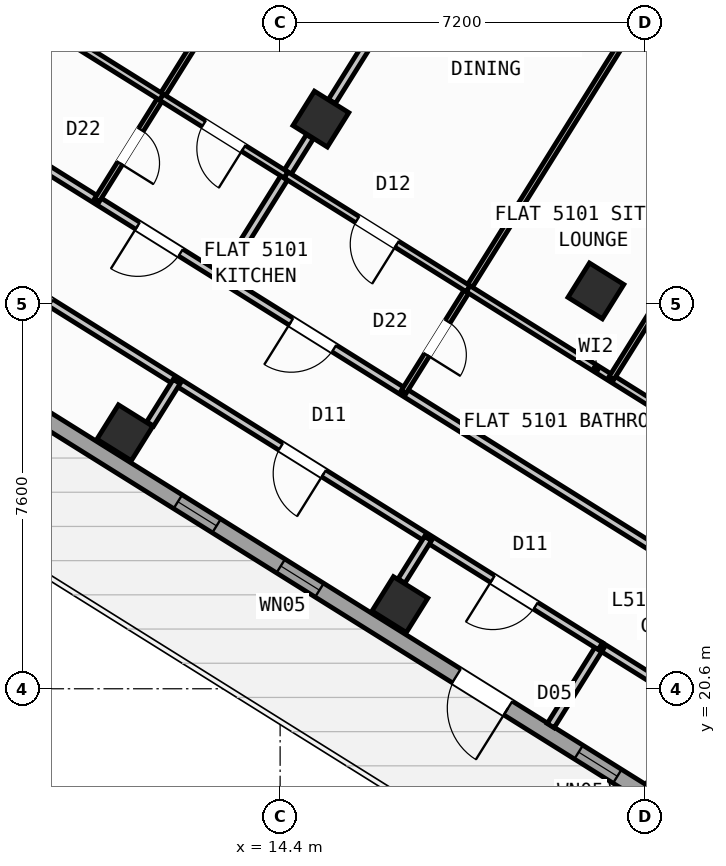
"""IFC4 building model, lengths in metres.
Left out: names, types, materials, properties, quantities, classifications, styles, units other than length and angle.
Written with IfcOpenShell. Run it as: python <this file> out.ifc"""

import sys

from ifc_helpers import new_model, si_unit, direction, frame, frame_2d, origin, origin_2d, place, context, subcontext, project, spatial, rectangle, hollow_rectangle, extrude, source, transform, mapped, element, fill, save


model = new_model("IFC4")
c1 = context("Model", 3, precision=1e-05, world=origin(), true_north=direction((0.0, 1.0)))
c2 = subcontext(c1, "Body", "Model", "MODEL_VIEW")
j1 = project(units=[si_unit("LENGTHUNIT", "METRE"), si_unit("PLANEANGLEUNIT", "RADIAN")], contexts=[c1])
p1 = place(None, origin())
s1 = spatial("IfcSite", under=j1, at=p1, CompositionType="ELEMENT")
p2 = place(p1, origin())
s2 = spatial("IfcBuilding", under=s1, at=p2, CompositionType="ELEMENT")
p3 = place(p2, frame((0.0, 0.0, 204.0)))
s3 = spatial("IfcBuildingStorey", under=s2, at=p3, CompositionType="ELEMENT", Elevation=204.0)
m1 = source(origin(), c2, "Body", "SweptSolid", [
    extrude(hollow_rectangle(XDim=0.8, YDim=0.8, WallThickness=0.032, at=origin_2d()), origin(), (0.0, 0.0, 1.0), 3.6),
])
for number, where, z_axis, x_axis in (
    (1, (20.632, 28.452, 0.0), (0.0, 0.0, 1.0), (-0.848, 0.53, 0.0)),
    (2, (16.764, 22.261, 0.0), (0.0, 0.0, 1.0), (-0.848, 0.53, 0.0)),
    (3, (15.205, 31.844, 0.0), (0.0, 0.0, 1.0), (-0.848, 0.53, 0.0)),
    (4, (11.336, 25.653, 0.0), (0.0, 0.0, 1.0), (-0.848, 0.53, 0.0)),
):
    element("IfcColumn", number, at=place(p3, frame(where, z_axis=z_axis, x_axis=x_axis)), inside=s3, PredefinedType="COLUMN", context=c2, shape_type="MappedRepresentation", body=[
        mapped(m1, transform((0.0, 0.0, 0.0), scale=1.0)),
    ])
p4 = place(p3, frame((31.76, 12.183, 0.0), z_axis=(0.0, 0.0, 1.0), x_axis=(-0.848047074256, 0.529920899612, 0.0)))
e5 = element("IfcWall", 5, at=p4, inside=s3, PredefinedType="STANDARD", context=c2, shape_type="SweptSolid", body=[
    extrude(rectangle(XDim=30.652, YDim=0.32, at=frame_2d((15.326, 0.0))), origin(), (0.0, 0.0, 1.0), 3.35),
])
p5 = place(p4, frame((15.166, 0.0, 0.0)))
e6 = element("IfcOpeningElement", 6, at=p5, cuts=e5, PredefinedType="OPENING", context=c2, shape_type="SweptSolid", body=[
    extrude(rectangle(XDim=1.2, YDim=2.15, at=frame_2d((0.6, 1.075))), frame((0.0, 0.17, 0.0), z_axis=(0.0, -1.0, 0.0), x_axis=(1.0, 0.0, 0.0)), (0.0, 0.0, 1.0), 0.34),
])
p6 = place(p4, frame((2.24, 0.0, 0.9)))
e7 = element("IfcOpeningElement", 7, at=p6, cuts=e5, PredefinedType="OPENING", context=c2, shape_type="SweptSolid", body=[
    extrude(rectangle(XDim=1.65, YDim=1.45, at=frame_2d((0.825, 0.725))), frame((0.0, 0.17, 0.0), z_axis=(0.0, -1.0, 0.0), x_axis=(1.0, 0.0, 0.0)), (0.0, 0.0, 1.0), 0.34),
])
p7 = place(p4, frame((7.469, 0.0, 0.9)))
e8 = element("IfcOpeningElement", 8, at=p7, cuts=e5, PredefinedType="OPENING", context=c2, shape_type="SweptSolid", body=[
    extrude(rectangle(XDim=1.65, YDim=1.45, at=frame_2d((0.825, 0.725))), frame((0.0, 0.17, 0.0), z_axis=(0.0, -1.0, 0.0), x_axis=(1.0, 0.0, 0.0)), (0.0, 0.0, 1.0), 0.34),
])
p8 = place(p4, frame((12.623, 0.0, 1.0)))
e9 = element("IfcOpeningElement", 9, at=p8, cuts=e5, PredefinedType="OPENING", context=c2, shape_type="SweptSolid", body=[
    extrude(rectangle(XDim=0.9, YDim=1.25, at=frame_2d((0.45, 0.625))), frame((0.0, 0.17, 0.0), z_axis=(0.0, -1.0, 0.0), x_axis=(1.0, 0.0, 0.0)), (0.0, 0.0, 1.0), 0.34),
])
p9 = place(p4, frame((19.556, 0.0, 1.0)))
e10 = element("IfcOpeningElement", 10, at=p9, cuts=e5, PredefinedType="OPENING", context=c2, shape_type="SweptSolid", body=[
    extrude(rectangle(XDim=0.9, YDim=1.25, at=frame_2d((0.45, 0.625))), frame((0.0, 0.17, 0.0), z_axis=(0.0, -1.0, 0.0), x_axis=(1.0, 0.0, 0.0)), (0.0, 0.0, 1.0), 0.34),
])
p10 = place(p4, frame((21.95, 0.0, 1.0)))
e11 = element("IfcOpeningElement", 11, at=p10, cuts=e5, PredefinedType="OPENING", context=c2, shape_type="SweptSolid", body=[
    extrude(rectangle(XDim=0.9, YDim=1.25, at=frame_2d((0.45, 0.625))), frame((0.0, 0.17, 0.0), z_axis=(0.0, -1.0, 0.0), x_axis=(1.0, 0.0, 0.0)), (0.0, 0.0, 1.0), 0.34),
])
p11 = place(p4, frame((26.983, 0.0, 0.9)))
e12 = element("IfcOpeningElement", 12, at=p11, cuts=e5, PredefinedType="OPENING", context=c2, shape_type="SweptSolid", body=[
    extrude(rectangle(XDim=1.35, YDim=1.45, at=frame_2d((0.675, 0.725))), frame((0.0, 0.17, 0.0), z_axis=(0.0, -1.0, 0.0), x_axis=(1.0, 0.0, 0.0)), (0.0, 0.0, 1.0), 0.34),
])
p12 = place(p3, frame((5.7, 28.71, 0.0), z_axis=(0.0, 0.0, 1.0), x_axis=(0.529923711467, 0.8480453172, 0.0)))
e13 = element("IfcWall", 13, at=p12, inside=s3, PredefinedType="STANDARD", context=c2, shape_type="SweptSolid", body=[
    extrude(rectangle(XDim=21.587, YDim=0.32, at=frame_2d((10.794, 0.0))), origin(), (0.0, 0.0, 1.0), 2.825),
])
p13 = place(p12, frame((4.749, 0.0, 1.0)))
e14 = element("IfcOpeningElement", 14, at=p13, cuts=e13, PredefinedType="OPENING", context=c2, shape_type="SweptSolid", body=[
    extrude(rectangle(XDim=0.9, YDim=1.25, at=frame_2d((0.45, 0.625))), frame((0.0, 0.17, 0.0), z_axis=(0.0, -1.0, 0.0), x_axis=(1.0, 0.0, 0.0)), (0.0, 0.0, 1.0), 0.34),
])
p14 = place(p12, frame((9.219, 0.0, 0.9)))
e15 = element("IfcOpeningElement", 15, at=p14, cuts=e13, PredefinedType="OPENING", context=c2, shape_type="SweptSolid", body=[
    extrude(rectangle(XDim=1.35, YDim=1.45, at=frame_2d((0.675, 0.725))), frame((0.0, 0.17, 0.0), z_axis=(0.0, -1.0, 0.0), x_axis=(1.0, 0.0, 0.0)), (0.0, 0.0, 1.0), 0.34),
])
p15 = place(p12, frame((12.119, 0.0, 0.9)))
e16 = element("IfcOpeningElement", 16, at=p15, cuts=e13, PredefinedType="OPENING", context=c2, shape_type="SweptSolid", body=[
    extrude(rectangle(XDim=1.35, YDim=1.45, at=frame_2d((0.675, 0.725))), frame((0.0, 0.17, 0.0), z_axis=(0.0, -1.0, 0.0), x_axis=(1.0, 0.0, 0.0)), (0.0, 0.0, 1.0), 0.34),
])
p16 = place(p12, frame((16.5, 0.0, 1.0)))
e17 = element("IfcOpeningElement", 17, at=p16, cuts=e13, PredefinedType="OPENING", context=c2, shape_type="SweptSolid", body=[
    extrude(rectangle(XDim=0.9, YDim=1.25, at=frame_2d((0.45, 0.625))), frame((0.0, 0.17, 0.0), z_axis=(0.0, -1.0, 0.0), x_axis=(1.0, 0.0, 0.0)), (0.0, 0.0, 1.0), 0.34),
])
p17 = place(p12, frame((18.913, 0.0, 1.0)))
e18 = element("IfcOpeningElement", 18, at=p17, cuts=e13, PredefinedType="OPENING", context=c2, shape_type="SweptSolid", body=[
    extrude(rectangle(XDim=0.9, YDim=1.25, at=frame_2d((0.45, 0.625))), frame((0.0, 0.17, 0.0), z_axis=(0.0, -1.0, 0.0), x_axis=(1.0, 0.0, 0.0)), (0.0, 0.0, 1.0), 0.34),
])
p18 = place(p3, frame((17.424, 47.083, 0.0), z_axis=(0.0, 0.0, 1.0), x_axis=(0.848049927979, -0.529916332693, 0.0)))
e19 = element("IfcWall", 19, at=p18, inside=s3, PredefinedType="STANDARD", context=c2, shape_type="SweptSolid", body=[
    extrude(rectangle(XDim=29.223, YDim=0.32, at=frame_2d((14.612, 0.0))), origin(), (0.0, 0.0, 1.0), 3.35),
])
p19 = place(p18, frame((8.799, 0.0, 0.0)))
e20 = element("IfcOpeningElement", 20, at=p19, cuts=e19, PredefinedType="OPENING", context=c2, shape_type="SweptSolid", body=[
    extrude(rectangle(XDim=1.05, YDim=2.15, at=frame_2d((0.525, 1.075))), frame((0.0, 0.17, 0.0), z_axis=(0.0, -1.0, 0.0), x_axis=(1.0, 0.0, 0.0)), (0.0, 0.0, 1.0), 0.34),
])
p20 = place(p18, frame((0.794, 0.0, 0.9)))
e21 = element("IfcOpeningElement", 21, at=p20, cuts=e19, PredefinedType="OPENING", context=c2, shape_type="SweptSolid", body=[
    extrude(rectangle(XDim=1.65, YDim=1.45, at=frame_2d((0.825, 0.725))), frame((0.0, 0.17, 0.0), z_axis=(0.0, -1.0, 0.0), x_axis=(1.0, 0.0, 0.0)), (0.0, 0.0, 1.0), 0.34),
])
p21 = place(p18, frame((4.056, 0.0, 0.9)))
e22 = element("IfcOpeningElement", 22, at=p21, cuts=e19, PredefinedType="OPENING", context=c2, shape_type="SweptSolid", body=[
    extrude(rectangle(XDim=1.35, YDim=1.45, at=frame_2d((0.675, 0.725))), frame((0.0, 0.17, 0.0), z_axis=(0.0, -1.0, 0.0), x_axis=(1.0, 0.0, 0.0)), (0.0, 0.0, 1.0), 0.34),
])
p22 = place(p18, frame((7.151, 0.0, 1.0)))
e23 = element("IfcOpeningElement", 23, at=p22, cuts=e19, PredefinedType="OPENING", context=c2, shape_type="SweptSolid", body=[
    extrude(rectangle(XDim=0.9, YDim=1.25, at=frame_2d((0.45, 0.625))), frame((0.0, 0.17, 0.0), z_axis=(0.0, -1.0, 0.0), x_axis=(1.0, 0.0, 0.0)), (0.0, 0.0, 1.0), 0.34),
])
p23 = place(p18, frame((14.612, 0.0, 1.0)))
e24 = element("IfcOpeningElement", 24, at=p23, cuts=e19, PredefinedType="OPENING", context=c2, shape_type="SweptSolid", body=[
    extrude(rectangle(XDim=0.9, YDim=1.25, at=frame_2d((0.45, 0.625))), frame((0.0, 0.17, 0.0), z_axis=(0.0, -1.0, 0.0), x_axis=(1.0, 0.0, 0.0)), (0.0, 0.0, 1.0), 0.34),
])
p24 = place(p18, frame((17.254, 0.0, 1.0)))
e25 = element("IfcOpeningElement", 25, at=p24, cuts=e19, PredefinedType="OPENING", context=c2, shape_type="SweptSolid", body=[
    extrude(rectangle(XDim=0.9, YDim=1.25, at=frame_2d((0.45, 0.625))), frame((0.0, 0.17, 0.0), z_axis=(0.0, -1.0, 0.0), x_axis=(1.0, 0.0, 0.0)), (0.0, 0.0, 1.0), 0.34),
])
p25 = place(p18, frame((21.139, 0.0, 0.9)))
e26 = element("IfcOpeningElement", 26, at=p25, cuts=e19, PredefinedType="OPENING", context=c2, shape_type="SweptSolid", body=[
    extrude(rectangle(XDim=1.35, YDim=1.45, at=frame_2d((0.675, 0.725))), frame((0.0, 0.17, 0.0), z_axis=(0.0, -1.0, 0.0), x_axis=(1.0, 0.0, 0.0)), (0.0, 0.0, 1.0), 0.34),
])
p26 = place(p18, frame((25.778, 0.0, 0.9)))
e27 = element("IfcOpeningElement", 27, at=p26, cuts=e19, PredefinedType="OPENING", context=c2, shape_type="SweptSolid", body=[
    extrude(rectangle(XDim=1.35, YDim=1.45, at=frame_2d((0.675, 0.725))), frame((0.0, 0.17, 0.0), z_axis=(0.0, -1.0, 0.0), x_axis=(1.0, 0.0, 0.0)), (0.0, 0.0, 1.0), 0.34),
])
p27 = place(p3, frame((22.677, 20.217, 0.0), z_axis=(0.0, 0.0, 1.0), x_axis=(-0.848057719594, 0.529903863203, 0.0)))
e28 = element("IfcWall", 28, at=p27, inside=s3, PredefinedType="PARTITIONING", context=c2, shape_type="SweptSolid", body=[
    extrude(rectangle(XDim=2.308, YDim=0.16, at=frame_2d((1.154, 0.0))), origin(), (0.0, 0.0, 1.0), 3.34),
])
p28 = place(p3, frame((20.719, 21.44, 0.0), z_axis=(0.0, 0.0, 1.0), x_axis=(-0.529880305451, -0.848072439061, 0.0)))
e29 = element("IfcWall", 29, at=p28, inside=s3, PredefinedType="PARTITIONING", context=c2, shape_type="SweptSolid", body=[
    extrude(rectangle(XDim=1.85, YDim=0.16, at=frame_2d((0.925, 0.0))), origin(), (0.0, 0.0, 1.0), 3.34),
])
p29 = place(p3, frame((21.885, 23.306, 0.0), z_axis=(0.0, 0.0, 1.0), x_axis=(-0.848052408131, 0.529912363569, 0.0)))
e30 = element("IfcWall", 30, at=p29, inside=s3, PredefinedType="PARTITIONING", context=c2, shape_type="SweptSolid", body=[
    extrude(rectangle(XDim=16.73, YDim=0.16, at=frame_2d((8.365, 0.0))), origin(), (0.0, 0.0, 1.0), 3.34),
])
p30 = place(p29, frame((7.57, 0.0, 0.0)))
e31 = element("IfcOpeningElement", 31, at=p30, cuts=e30, PredefinedType="OPENING", context=c2, shape_type="SweptSolid", body=[
    extrude(rectangle(XDim=1.0, YDim=2.1, at=frame_2d((0.5, 1.05))), frame((0.0, 0.09, 0.0), z_axis=(0.0, -1.0, 0.0), x_axis=(1.0, 0.0, 0.0)), (0.0, 0.0, 1.0), 0.18),
])
p31 = place(p29, frame((11.14, 0.0, 0.0)))
e32 = element("IfcOpeningElement", 32, at=p31, cuts=e30, PredefinedType="OPENING", context=c2, shape_type="SweptSolid", body=[
    extrude(rectangle(XDim=1.0, YDim=2.1, at=frame_2d((0.5, 1.05))), frame((0.0, 0.09, 0.0), z_axis=(0.0, -1.0, 0.0), x_axis=(1.0, 0.0, 0.0)), (0.0, 0.0, 1.0), 0.18),
])
p32 = place(p3, frame((20.719, 21.44, 0.0), z_axis=(0.0, 0.0, 1.0), x_axis=(-0.848048310262, 0.529918921593, 0.0)))
e33 = element("IfcWall", 33, at=p32, inside=s3, PredefinedType="PARTITIONING", context=c2, shape_type="SweptSolid", body=[
    extrude(rectangle(XDim=16.73, YDim=0.16, at=frame_2d((8.365, 0.0))), origin(), (0.0, 0.0, 1.0), 3.34),
])
p33 = place(p32, frame((1.505, 0.0, 0.0)))
e34 = element("IfcOpeningElement", 34, at=p33, cuts=e33, PredefinedType="OPENING", context=c2, shape_type="SweptSolid", body=[
    extrude(rectangle(XDim=1.0, YDim=2.1, at=frame_2d((0.5, 1.05))), frame((0.0, 0.09, 0.0), z_axis=(0.0, -1.0, 0.0), x_axis=(1.0, 0.0, 0.0)), (0.0, 0.0, 1.0), 0.18),
])
p34 = place(p32, frame((6.435, 0.0, 0.0)))
e35 = element("IfcOpeningElement", 35, at=p34, cuts=e33, PredefinedType="OPENING", context=c2, shape_type="SweptSolid", body=[
    extrude(rectangle(XDim=1.0, YDim=2.1, at=frame_2d((0.5, 1.05))), frame((0.0, 0.09, 0.0), z_axis=(0.0, -1.0, 0.0), x_axis=(1.0, 0.0, 0.0)), (0.0, 0.0, 1.0), 0.18),
])
p35 = place(p32, frame((12.784, 0.0, 0.0)))
e36 = element("IfcOpeningElement", 36, at=p35, cuts=e33, PredefinedType="OPENING", context=c2, shape_type="SweptSolid", body=[
    extrude(rectangle(XDim=1.0, YDim=2.1, at=frame_2d((0.5, 1.05))), frame((0.0, 0.09, 0.0), z_axis=(0.0, -1.0, 0.0), x_axis=(1.0, 0.0, 0.0)), (0.0, 0.0, 1.0), 0.18),
])
p36 = place(p3, frame((17.319, 23.565, 0.0), z_axis=(0.0, 0.0, 1.0), x_axis=(-0.529821225456, -0.848109349704, 0.0)))
e37 = element("IfcWall", 37, at=p36, inside=s3, PredefinedType="PARTITIONING", context=c2, shape_type="SweptSolid", body=[
    extrude(rectangle(XDim=0.988, YDim=0.16, at=frame_2d((0.494, 0.0))), origin(), (0.0, 0.0, 1.0), 2.825),
])
p37 = place(p3, frame((12.359, 26.665, 0.0), z_axis=(0.0, 0.0, 1.0), x_axis=(-0.529821225456, -0.848109349704, 0.0)))
e38 = element("IfcWall", 38, at=p37, inside=s3, PredefinedType="PARTITIONING", context=c2, shape_type="SweptSolid", body=[
    extrude(rectangle(XDim=0.988, YDim=0.16, at=frame_2d((0.494, 0.0))), origin(), (0.0, 0.0, 1.0), 3.34),
])
p38 = place(p3, frame((18.854, 37.685, 0.0), z_axis=(0.0, 0.0, 1.0), x_axis=(-0.529907440938, -0.848055484057, 0.0)))
e39 = element("IfcWall", 39, at=p38, inside=s3, PredefinedType="PARTITIONING", context=c2, shape_type="SweptSolid", body=[
    extrude(rectangle(XDim=6.476, YDim=0.16, at=frame_2d((3.238, 0.0))), origin(), (0.0, 0.0, 1.0), 2.825),
])
p39 = place(p3, frame((14.986, 31.494, 0.0), z_axis=(0.0, 0.0, 1.0), x_axis=(-0.529885466561, -0.848069214349, 0.0)))
e40 = element("IfcWall", 40, at=p39, inside=s3, PredefinedType="PARTITIONING", context=c2, shape_type="SweptSolid", body=[
    extrude(rectangle(XDim=3.288, YDim=0.16, at=frame_2d((1.644, 0.0))), origin(), (0.0, 0.0, 1.0), 2.825),
])
p40 = place(p3, frame((26.336, 41.656, 0.0), z_axis=(0.0, 0.0, 1.0), x_axis=(-0.529916887708, -0.848049581169, 0.0)))
e41 = element("IfcWall", 41, at=p40, inside=s3, PredefinedType="PARTITIONING", context=c2, shape_type="SweptSolid", body=[
    extrude(rectangle(XDim=17.92, YDim=0.11, at=frame_2d((8.96, 0.0))), origin(), (0.0, 0.0, 1.0), 2.995),
])
p41 = place(p40, frame((16.28, 0.0, 0.0)))
e42 = element("IfcOpeningElement", 42, at=p41, cuts=e41, PredefinedType="OPENING", context=c2, shape_type="SweptSolid", body=[
    extrude(rectangle(XDim=0.78, YDim=2.05, at=frame_2d((0.39, 1.025))), frame((0.0, 0.065, 0.0), z_axis=(0.0, -1.0, 0.0), x_axis=(1.0, 0.0, 0.0)), (0.0, 0.0, 1.0), 0.13),
])
p42 = place(p40, frame((7.3, 0.0, 0.0)))
e43 = element("IfcOpeningElement", 43, at=p42, cuts=e41, PredefinedType="OPENING", context=c2, shape_type="SweptSolid", body=[
    extrude(rectangle(XDim=0.92, YDim=2.08, at=frame_2d((0.46, 1.04))), frame((0.0, 0.065, 0.0), z_axis=(0.0, -1.0, 0.0), x_axis=(1.0, 0.0, 0.0)), (0.0, 0.0, 1.0), 0.13),
])
p43 = place(p3, frame((18.111, 28.494, 0.0), z_axis=(0.0, 0.0, 1.0), x_axis=(-0.848024181217, 0.529957534215, 0.0)))
e44 = element("IfcWall", 44, at=p43, inside=s3, PredefinedType="PLUMBINGWALL", context=c2, shape_type="SweptSolid", body=[
    extrude(rectangle(XDim=4.24, YDim=0.14, at=frame_2d((2.12, 0.0))), origin(), (0.0, 0.0, 1.0), 3.34),
])
p44 = place(p43, frame((1.66, 0.0, 0.0)))
e45 = element("IfcOpeningElement", 45, at=p44, cuts=e44, PredefinedType="OPENING", context=c2, shape_type="SweptSolid", body=[
    extrude(rectangle(XDim=0.92, YDim=2.08, at=frame_2d((0.46, 1.04))), frame((0.0, 0.08, 0.0), z_axis=(0.0, -1.0, 0.0), x_axis=(1.0, 0.0, 0.0)), (0.0, 0.0, 1.0), 0.16),
])
p45 = place(p3, frame((23.157, 25.341, 0.0), z_axis=(0.0, 0.0, 1.0), x_axis=(-0.848062843461, 0.529895662882, 0.0)))
e46 = element("IfcWall", 46, at=p45, inside=s3, PredefinedType="PLUMBINGWALL", context=c2, shape_type="SweptSolid", body=[
    extrude(rectangle(XDim=5.95, YDim=0.14, at=frame_2d((2.975, 0.0))), origin(), (0.0, 0.0, 1.0), 3.34),
])
p46 = place(p3, frame((29.161, 39.89, 0.0), z_axis=(0.0, 0.0, 1.0), x_axis=(-0.529915512424, -0.848050440535, 0.0)))
e47 = element("IfcWall", 47, at=p46, inside=s3, PredefinedType="PARTITIONING", context=c2, shape_type="SweptSolid", body=[
    extrude(rectangle(XDim=15.52, YDim=0.11, at=frame_2d((7.76, 0.0))), origin(), (0.0, 0.0, 1.0), 3.34),
])
p47 = place(p46, frame((7.345, 0.0, 0.0)))
e48 = element("IfcOpeningElement", 48, at=p47, cuts=e47, PredefinedType="OPENING", context=c2, shape_type="SweptSolid", body=[
    extrude(rectangle(XDim=0.92, YDim=2.08, at=frame_2d((0.46, 1.04))), frame((0.0, 0.065, 0.0), z_axis=(0.0, -1.0, 0.0), x_axis=(1.0, 0.0, 0.0)), (0.0, 0.0, 1.0), 0.13),
])
p48 = place(p3, frame((20.281, 45.44, 0.0), z_axis=(0.0, 0.0, 1.0), x_axis=(-0.529916887708, -0.848049581169, 0.0)))
e49 = element("IfcWall", 49, at=p48, inside=s3, PredefinedType="PARTITIONING", context=c2, shape_type="SweptSolid", body=[
    extrude(rectangle(XDim=17.92, YDim=0.11, at=frame_2d((8.96, 0.0))), origin(), (0.0, 0.0, 1.0), 3.34),
])
p49 = place(p48, frame((16.28, 0.0, 0.0)))
e50 = element("IfcOpeningElement", 50, at=p49, cuts=e49, PredefinedType="OPENING", context=c2, shape_type="SweptSolid", body=[
    extrude(rectangle(XDim=0.78, YDim=2.05, at=frame_2d((0.39, 1.025))), frame((0.0, 0.065, 0.0), z_axis=(0.0, -1.0, 0.0), x_axis=(1.0, 0.0, 0.0)), (0.0, 0.0, 1.0), 0.13),
])
p50 = place(p48, frame((10.711, 0.0, 0.0)))
e51 = element("IfcOpeningElement", 51, at=p50, cuts=e49, PredefinedType="OPENING", context=c2, shape_type="SweptSolid", body=[
    extrude(rectangle(XDim=0.92, YDim=2.08, at=frame_2d((0.46, 1.04))), frame((0.0, 0.065, 0.0), z_axis=(0.0, -1.0, 0.0), x_axis=(1.0, 0.0, 0.0)), (0.0, 0.0, 1.0), 0.13),
])
p51 = place(p3, frame((14.516, 30.741, 0.0), z_axis=(0.0, 0.0, 1.0), x_axis=(-0.848059786386, 0.529900555496, 0.0)))
e52 = element("IfcWall", 52, at=p51, inside=s3, PredefinedType="PLUMBINGWALL", context=c2, shape_type="SweptSolid", body=[
    extrude(rectangle(XDim=2.9, YDim=0.14, at=frame_2d((1.45, 0.0))), origin(), (0.0, 0.0, 1.0), 3.34),
])
p52 = place(p51, frame((0.99, 0.0, 0.0)))
e53 = element("IfcOpeningElement", 53, at=p52, cuts=e52, PredefinedType="OPENING", context=c2, shape_type="SweptSolid", body=[
    extrude(rectangle(XDim=0.92, YDim=2.08, at=frame_2d((0.46, 1.04))), frame((0.0, 0.08, 0.0), z_axis=(0.0, -1.0, 0.0), x_axis=(1.0, 0.0, 0.0)), (0.0, 0.0, 1.0), 0.16),
])
p53 = place(p3, frame((12.056, 32.278, 0.0), z_axis=(0.0, 0.0, 1.0), x_axis=(-0.848039976902, 0.529932257535, 0.0)))
e54 = element("IfcWall", 54, at=p53, inside=s3, PredefinedType="PLUMBINGWALL", context=c2, shape_type="SweptSolid", body=[
    extrude(rectangle(XDim=3.62, YDim=0.14, at=frame_2d((1.81, 0.0))), origin(), (0.0, 0.0, 1.0), 3.34),
])
m2 = source(origin(), c2, "Body", "SweptSolid", [
    extrude(rectangle(XDim=1.2, YDim=2.15, at=frame_2d((0.6, 1.075))), frame((0.0, 0.025, 0.0), z_axis=(0.0, -1.0, 0.0), x_axis=(1.0, 0.0, 0.0)), (0.0, 0.0, 1.0), 0.05),
])
p54 = place(p5, origin())
e55 = element("IfcDoor", 55, at=p54, inside=s3, OperationType="SINGLE_SWING_LEFT", PredefinedType="DOOR", context=c2, shape_type="MappedRepresentation", body=[
    mapped(m2, transform((0.0, 0.0, 0.0), scale=1.0)),
])
fill(e6, e55)
m3 = source(origin(), c2, "Body", "SweptSolid", [
    extrude(rectangle(XDim=0.9, YDim=1.25, at=frame_2d((0.45, 0.625))), frame((0.0, 0.03, 0.0), z_axis=(0.0, -1.0, 0.0), x_axis=(1.0, 0.0, 0.0)), (0.0, 0.0, 1.0), 0.06),
])
p55 = place(p8, origin())
e56 = element("IfcWindow", 56, at=p55, inside=s3, PartitioningType="SINGLE_PANEL", PredefinedType="WINDOW", context=c2, shape_type="MappedRepresentation", body=[
    mapped(m3, transform((0.0, 0.0, 0.0), scale=1.0)),
])
fill(e9, e56)
p56 = place(p9, origin())
e57 = element("IfcWindow", 57, at=p56, inside=s3, PartitioningType="SINGLE_PANEL", PredefinedType="WINDOW", context=c2, shape_type="MappedRepresentation", body=[
    mapped(m3, transform((0.0, 0.0, 0.0), scale=1.0)),
])
fill(e10, e57)
p57 = place(p10, origin())
e58 = element("IfcWindow", 58, at=p57, inside=s3, PartitioningType="SINGLE_PANEL", PredefinedType="WINDOW", context=c2, shape_type="MappedRepresentation", body=[
    mapped(m3, transform((0.0, 0.0, 0.0), scale=1.0)),
])
fill(e11, e58)
m4 = source(origin(), c2, "Body", "SweptSolid", [
    extrude(rectangle(XDim=1.0, YDim=2.1, at=frame_2d((0.5, 1.05))), frame((0.0, 0.025, 0.0), z_axis=(0.0, -1.0, 0.0), x_axis=(1.0, 0.0, 0.0)), (0.0, 0.0, 1.0), 0.05),
])
p58 = place(p33, origin())
e59 = element("IfcDoor", 59, at=p58, inside=s3, OperationType="SINGLE_SWING_RIGHT", PredefinedType="DOOR", context=c2, shape_type="MappedRepresentation", body=[
    mapped(m4, transform((0.0, 0.0, 0.0), scale=1.0)),
])
fill(e34, e59)
p59 = place(p34, origin())
e60 = element("IfcDoor", 60, at=p59, inside=s3, OperationType="SINGLE_SWING_LEFT", PredefinedType="DOOR", context=c2, shape_type="MappedRepresentation", body=[
    mapped(m4, transform((0.0, 0.0, 0.0), scale=1.0)),
])
fill(e35, e60)
p60 = place(p30, origin())
e61 = element("IfcDoor", 61, at=p60, inside=s3, OperationType="SINGLE_SWING_RIGHT", PredefinedType="DOOR", context=c2, shape_type="MappedRepresentation", body=[
    mapped(m4, transform((0.0, 0.0, 0.0), scale=1.0)),
])
fill(e31, e61)
m5 = source(origin(), c2, "Body", "SweptSolid", [
    extrude(rectangle(XDim=0.92, YDim=2.08, at=frame_2d((0.46, 1.04))), frame((0.0, 0.025, 0.0), z_axis=(0.0, -1.0, 0.0), x_axis=(1.0, 0.0, 0.0)), (0.0, 0.0, 1.0), 0.05),
])
p61 = place(p44, origin())
e62 = element("IfcDoor", 62, at=p61, inside=s3, OperationType="SINGLE_SWING_LEFT", PredefinedType="DOOR", context=c2, shape_type="MappedRepresentation", body=[
    mapped(m5, transform((0.0, 0.0, 0.0), scale=1.0)),
])
fill(e45, e62)
m6 = source(origin(), c2, "Body", "SweptSolid", [
    extrude(rectangle(XDim=0.78, YDim=2.05, at=frame_2d((0.39, 1.025))), frame((0.0, 0.025, 0.0), z_axis=(0.0, -1.0, 0.0), x_axis=(1.0, 0.0, 0.0)), (0.0, 0.0, 1.0), 0.05),
])
p62 = place(p41, origin())
e63 = element("IfcDoor", 63, at=p62, inside=s3, OperationType="SINGLE_SWING_RIGHT", PredefinedType="DOOR", context=c2, shape_type="MappedRepresentation", body=[
    mapped(m6, transform((0.0, 0.0, 0.0), scale=1.0)),
])
fill(e42, e63)
p63 = place(p31, origin())
e64 = element("IfcDoor", 64, at=p63, inside=s3, OperationType="SINGLE_SWING_RIGHT", PredefinedType="DOOR", context=c2, shape_type="MappedRepresentation", body=[
    mapped(m4, transform((0.0, 0.0, 0.0), scale=1.0)),
])
fill(e32, e64)
p64 = place(p52, origin())
e65 = element("IfcDoor", 65, at=p64, inside=s3, OperationType="SINGLE_SWING_LEFT", PredefinedType="DOOR", context=c2, shape_type="MappedRepresentation", body=[
    mapped(m5, transform((0.0, 0.0, 0.0), scale=1.0)),
])
fill(e53, e65)
p65 = place(p49, origin())
e66 = element("IfcDoor", 66, at=p65, inside=s3, OperationType="SINGLE_SWING_RIGHT", PredefinedType="DOOR", context=c2, shape_type="MappedRepresentation", body=[
    mapped(m6, transform((0.0, 0.0, 0.0), scale=1.0)),
])
fill(e50, e66)
save(model, sys.argv[1])
